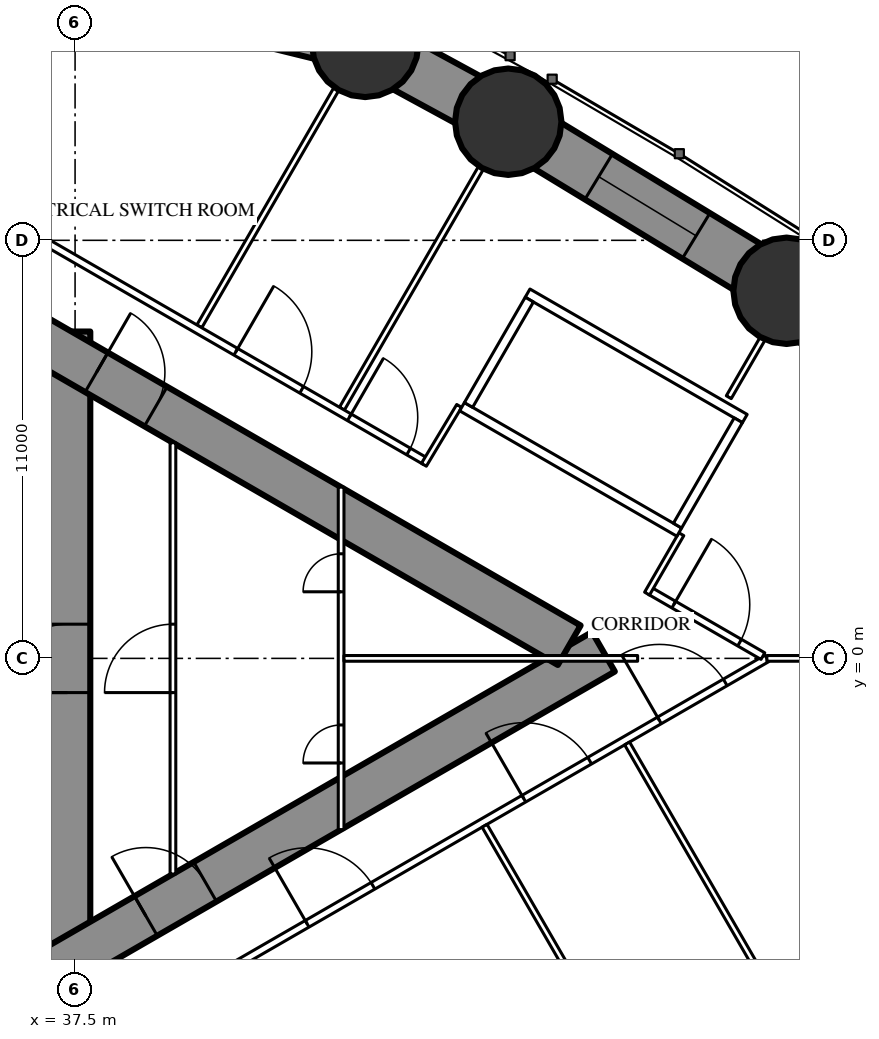
"""IFC4 building model, lengths in metres.
Left out: names, types, materials, properties, quantities, classifications, styles, units other than length and angle.
Written with IfcOpenShell. Run it as: python <this file> out.ifc"""

import sys

from ifc_helpers import new_model, si_unit, direction, frame, frame_2d, origin, origin_2d, place, context, subcontext, project, spatial, rectangle, circle, extrude, element, fill, save


model = new_model("IFC4")
c1 = context("Model", 3, precision=1e-05, world=origin(), true_north=direction((0.0, 1.0)))
c2 = subcontext(c1, "Body", "Model", "MODEL_VIEW")
j1 = project(units=[si_unit("LENGTHUNIT", "METRE"), si_unit("PLANEANGLEUNIT", "RADIAN")], contexts=[c1])
p1 = place(None, origin())
s1 = spatial("IfcSite", under=j1, at=p1, CompositionType="ELEMENT")
p2 = place(p1, origin())
s2 = spatial("IfcBuilding", under=s1, at=p2, CompositionType="ELEMENT")
p3 = place(p2, frame((0.0, 0.0, 201.8)))
s3 = spatial("IfcBuildingStorey", under=s2, at=p3, CompositionType="ELEMENT", Elevation=201.8)
for number, where, z_axis, x_axis in (
    (1, (56.221, 9.672, 0.0), (0.0, 0.0, 1.0), (1.0, 0.0, 0.0)),
    (2, (48.897, 14.121, 0.0), (0.0, 0.0, 1.0), (1.0, 0.0, 0.0)),
    (3, (45.134, 16.168, 0.0), (0.0, 0.0, 1.0), (1.0, 0.0, 0.0)),
):
    element("IfcColumn", number, at=place(p3, frame(where, z_axis=z_axis, x_axis=x_axis)), inside=s3, PredefinedType="COLUMN", context=c2, shape_type="SweptSolid", body=[
        extrude(circle(Radius=1.4, at=origin_2d()), origin(), (0.0, 0.0, 1.0), 3.5),
    ])
p4 = place(p3, frame((37.3, -8.6, 0.0), z_axis=(0.0, 0.0, 1.0), x_axis=(0.0, 1.0, 0.0)))
e4 = element("IfcWall", 4, at=p4, inside=s3, PredefinedType="SHEAR", context=c2, shape_type="SweptSolid", body=[
    extrude(rectangle(XDim=17.2, YDim=1.2, at=frame_2d((8.6, 0.0))), origin(), (0.0, 0.0, 1.0), 3.5),
])
p5 = place(p4, frame((7.7, 0.0, 0.0)))
e5 = element("IfcOpeningElement", 5, at=p5, cuts=e4, PredefinedType="OPENING", context=c2, shape_type="SweptSolid", body=[
    extrude(rectangle(XDim=1.8, YDim=2.2, at=frame_2d((0.9, 1.1))), frame((0.0, 0.61, 0.0), z_axis=(0.0, -1.0, 0.0), x_axis=(1.0, 0.0, 0.0)), (0.0, 0.0, 1.0), 1.22),
])
p6 = place(p3, frame((27.2, -13.8, 0.0), z_axis=(0.0, 0.0, 1.0), x_axis=(0.866027159892, 0.499996958321, 0.0)))
e6 = element("IfcWall", 6, at=p6, inside=s3, PredefinedType="SHEAR", context=c2, shape_type="SweptSolid", body=[
    extrude(rectangle(XDim=27.947, YDim=1.2, at=frame_2d((13.973, 0.0))), origin(), (0.0, 0.0, 1.0), 3.5),
])
p7 = place(p6, frame((6.5, 0.0, 0.0)))
e7 = element("IfcOpeningElement", 7, at=p7, cuts=e6, PredefinedType="OPENING", context=c2, shape_type="SweptSolid", body=[
    extrude(rectangle(XDim=1.0, YDim=2.2, at=frame_2d((0.5, 1.1))), frame((0.0, 0.61, 0.0), z_axis=(0.0, -1.0, 0.0), x_axis=(1.0, 0.0, 0.0)), (0.0, 0.0, 1.0), 1.22),
])
p8 = place(p6, frame((14.045, 0.0, 0.0)))
e8 = element("IfcOpeningElement", 8, at=p8, cuts=e6, PredefinedType="OPENING", context=c2, shape_type="SweptSolid", body=[
    extrude(rectangle(XDim=1.8, YDim=2.2, at=frame_2d((0.9, 1.1))), frame((0.0, 0.61, 0.0), z_axis=(0.0, -1.0, 0.0), x_axis=(1.0, 0.0, 0.0)), (0.0, 0.0, 1.0), 1.22),
])
p9 = place(p3, frame((27.2, 13.8, 0.0), z_axis=(0.0, 0.0, 1.0), x_axis=(0.866024515034, -0.500001539357, 0.0)))
e9 = element("IfcWall", 9, at=p9, inside=s3, PredefinedType="SHEAR", context=c2, shape_type="SweptSolid", body=[
    extrude(rectangle(XDim=26.907, YDim=1.2, at=frame_2d((13.454, 0.0))), origin(), (0.0, 0.0, 1.0), 3.5),
])
p10 = place(p9, frame((6.5, 0.0, 0.0)))
e10 = element("IfcOpeningElement", 10, at=p10, cuts=e9, PredefinedType="OPENING", context=c2, shape_type="SweptSolid", body=[
    extrude(rectangle(XDim=1.0, YDim=2.2, at=frame_2d((0.5, 1.1))), frame((0.0, 0.61, 0.0), z_axis=(0.0, -1.0, 0.0), x_axis=(1.0, 0.0, 0.0)), (0.0, 0.0, 1.0), 1.22),
])
p11 = place(p9, frame((12.545, 0.0, 0.0)))
e11 = element("IfcOpeningElement", 11, at=p11, cuts=e9, PredefinedType="OPENING", context=c2, shape_type="SweptSolid", body=[
    extrude(rectangle(XDim=1.8, YDim=2.2, at=frame_2d((0.9, 1.1))), frame((0.0, 0.61, 0.0), z_axis=(0.0, -1.0, 0.0), x_axis=(1.0, 0.0, 0.0)), (0.0, 0.0, 1.0), 1.22),
])
p12 = place(p3, frame((56.221, -9.672, 0.0), z_axis=(0.0, 0.0, 1.0), x_axis=(0.697649905443, 0.716438838587, 0.0)))
e12 = element("IfcWall", 12, at=p12, inside=s3, PredefinedType="SHEAR", context=c2, shape_type="SweptSolid", body=[
    extrude(rectangle(XDim=13.501, YDim=1.4, at=frame_2d((6.75, 0.0))), origin(), (0.0, 0.0, 1.0), 3.5),
])
p13 = place(p12, frame((5.25, 0.0, 0.6)))
e13 = element("IfcOpeningElement", 13, at=p13, cuts=e12, PredefinedType="OPENING", context=c2, shape_type="SweptSolid", body=[
    extrude(rectangle(XDim=3.0, YDim=1.2, at=frame_2d((1.5, 0.6))), frame((0.0, 0.71, 0.0), z_axis=(0.0, -1.0, 0.0), x_axis=(1.0, 0.0, 0.0)), (0.0, 0.0, 1.0), 1.42),
])
p14 = place(p3, frame((65.64, 0.0, 0.0), z_axis=(0.0, 0.0, 1.0), x_axis=(-0.697649905443, 0.716438838587, 0.0)))
e14 = element("IfcWall", 14, at=p14, inside=s3, PredefinedType="SHEAR", context=c2, shape_type="SweptSolid", body=[
    extrude(rectangle(XDim=13.501, YDim=1.4, at=frame_2d((6.75, 0.0))), origin(), (0.0, 0.0, 1.0), 3.5),
])
p15 = place(p14, frame((5.25, 0.0, 0.6)))
e15 = element("IfcOpeningElement", 15, at=p15, cuts=e14, PredefinedType="OPENING", context=c2, shape_type="SweptSolid", body=[
    extrude(rectangle(XDim=3.0, YDim=1.2, at=frame_2d((1.5, 0.6))), frame((0.0, 0.71, 0.0), z_axis=(0.0, -1.0, 0.0), x_axis=(1.0, 0.0, 0.0)), (0.0, 0.0, 1.0), 1.42),
])
p16 = place(p3, frame((56.221, 9.672, 0.0), z_axis=(0.0, 0.0, 1.0), x_axis=(-0.854692251129, 0.519135007353, 0.0)))
e16 = element("IfcWall", 16, at=p16, inside=s3, PredefinedType="SHEAR", context=c2, shape_type="SweptSolid", body=[
    extrude(rectangle(XDim=8.569, YDim=1.4, at=frame_2d((4.284, 0.0))), origin(), (0.0, 0.0, 1.0), 3.5),
])
p17 = place(p16, frame((2.784, 0.0, 0.6)))
e17 = element("IfcOpeningElement", 17, at=p17, cuts=e16, PredefinedType="OPENING", context=c2, shape_type="SweptSolid", body=[
    extrude(rectangle(XDim=3.0, YDim=1.2, at=frame_2d((1.5, 0.6))), frame((0.0, 0.71, 0.0), z_axis=(0.0, -1.0, 0.0), x_axis=(1.0, 0.0, 0.0)), (0.0, 0.0, 1.0), 1.42),
])
p18 = place(p3, frame((48.897, 14.121, 0.0), z_axis=(0.0, 0.0, 1.0), x_axis=(-0.878404597051, 0.477917737566, 0.0)))
e18 = element("IfcWall", 18, at=p18, inside=s3, PredefinedType="SHEAR", context=c2, shape_type="SweptSolid", body=[
    extrude(rectangle(XDim=4.285, YDim=1.4, at=frame_2d((2.143, 0.0))), origin(), (0.0, 0.0, 1.0), 3.5),
])
p19 = place(p3, frame((45.134, 16.168, 0.0), z_axis=(0.0, 0.0, 1.0), x_axis=(-0.971093253227, 0.238700426344, 0.0)))
e19 = element("IfcWall", 19, at=p19, inside=s3, PredefinedType="SHEAR", context=c2, shape_type="SweptSolid", body=[
    extrude(rectangle(XDim=13.772, YDim=1.4, at=frame_2d((6.886, 0.0))), origin(), (0.0, 0.0, 1.0), 3.5),
])
p20 = place(p19, frame((5.386, 0.0, 0.6)))
e20 = element("IfcOpeningElement", 20, at=p20, cuts=e19, PredefinedType="OPENING", context=c2, shape_type="SweptSolid", body=[
    extrude(rectangle(XDim=3.0, YDim=1.2, at=frame_2d((1.5, 0.6))), frame((0.0, 0.71, 0.0), z_axis=(0.0, -1.0, 0.0), x_axis=(1.0, 0.0, 0.0)), (0.0, 0.0, 1.0), 1.42),
])
p21 = place(p3, frame((27.903, -16.05, 0.0), z_axis=(0.0, 0.0, 1.0), x_axis=(0.866022581743, 0.500004887887, 0.0)))
e21 = element("IfcWall", 21, at=p21, inside=s3, PredefinedType="PARTITIONING", context=c2, shape_type="SweptSolid", body=[
    extrude(rectangle(XDim=32.1, YDim=0.2, at=frame_2d((16.05, 0.0))), origin(), (0.0, 0.0, 1.0), 3.25),
])
p22 = place(p21, frame((5.212, 0.0, 0.0)))
e22 = element("IfcOpeningElement", 22, at=p22, cuts=e21, PredefinedType="OPENING", context=c2, shape_type="SweptSolid", body=[
    extrude(rectangle(XDim=2.0, YDim=2.4, at=frame_2d((1.0, 1.2))), frame((0.0, 0.11, 0.0), z_axis=(0.0, -1.0, 0.0), x_axis=(1.0, 0.0, 0.0)), (0.0, 0.0, 1.0), 0.22),
])
p23 = place(p21, frame((18.133, 0.0, 0.0)))
e23 = element("IfcOpeningElement", 23, at=p23, cuts=e21, PredefinedType="OPENING", context=c2, shape_type="SweptSolid", body=[
    extrude(rectangle(XDim=2.0, YDim=2.4, at=frame_2d((1.0, 1.2))), frame((0.0, 0.11, 0.0), z_axis=(0.0, -1.0, 0.0), x_axis=(1.0, 0.0, 0.0)), (0.0, 0.0, 1.0), 0.22),
])
p24 = place(p21, frame((24.717, 0.0, 0.0)))
e24 = element("IfcOpeningElement", 24, at=p24, cuts=e21, PredefinedType="OPENING", context=c2, shape_type="SweptSolid", body=[
    extrude(rectangle(XDim=2.0, YDim=2.4, at=frame_2d((1.0, 1.2))), frame((0.0, 0.11, 0.0), z_axis=(0.0, -1.0, 0.0), x_axis=(1.0, 0.0, 0.0)), (0.0, 0.0, 1.0), 0.22),
])
p25 = place(p21, frame((28.836, 0.0, 0.0)))
e25 = element("IfcOpeningElement", 25, at=p25, cuts=e21, PredefinedType="OPENING", context=c2, shape_type="SweptSolid", body=[
    extrude(rectangle(XDim=2.0, YDim=2.4, at=frame_2d((1.0, 1.2))), frame((0.0, 0.11, 0.0), z_axis=(0.0, -1.0, 0.0), x_axis=(1.0, 0.0, 0.0)), (0.0, 0.0, 1.0), 0.22),
])
p26 = place(p3, frame((48.275, -4.404, 0.0), z_axis=(0.0, 0.0, 1.0), x_axis=(0.500006004368, -0.866021937133, 0.0)))
e26 = element("IfcWall", 26, at=p26, inside=s3, PredefinedType="PARTITIONING", context=c2, shape_type="SweptSolid", body=[
    extrude(rectangle(XDim=7.279, YDim=0.15, at=frame_2d((3.64, 0.0))), origin(), (0.0, 0.0, 1.0), 2.05),
])
p27 = place(p3, frame((52.025, -2.238, 0.0), z_axis=(0.0, 0.0, 1.0), x_axis=(0.499983785035, -0.866034765296, 0.0)))
e27 = element("IfcWall", 27, at=p27, inside=s3, PredefinedType="PARTITIONING", context=c2, shape_type="SweptSolid", body=[
    extrude(rectangle(XDim=7.116, YDim=0.15, at=frame_2d((3.558, 0.0))), origin(), (0.0, 0.0, 1.0), 2.05),
])
p28 = place(p3, frame((40.769, 8.737, 0.0), z_axis=(0.0, 0.0, 1.0), x_axis=(0.500013115284, 0.866017831539, 0.0)))
e28 = element("IfcWall", 28, at=p28, inside=s3, PredefinedType="PARTITIONING", context=c2, shape_type="SweptSolid", body=[
    extrude(rectangle(XDim=7.198, YDim=0.15, at=frame_2d((3.599, 0.0))), origin(), (0.0, 0.0, 1.0), 2.05),
])
p29 = place(p3, frame((44.521, 6.571, 0.0), z_axis=(0.0, 0.0, 1.0), x_axis=(0.500020376429, 0.866013639128, 0.0)))
e29 = element("IfcWall", 29, at=p29, inside=s3, PredefinedType="PARTITIONING", context=c2, shape_type="SweptSolid", body=[
    extrude(rectangle(XDim=7.306, YDim=0.15, at=frame_2d((3.653, 0.0))), origin(), (0.0, 0.0, 1.0), 2.05),
])
p30 = place(p3, frame((55.702, 0.0, 0.0), z_axis=(0.0, 0.0, 1.0), x_axis=(1.0, 0.0, 0.0)))
e30 = element("IfcWall", 30, at=p30, inside=s3, PredefinedType="PARTITIONING", context=c2, shape_type="SweptSolid", body=[
    extrude(rectangle(XDim=8.518, YDim=0.15, at=frame_2d((4.259, 0.0))), origin(), (0.0, 0.0, 1.0), 2.05),
])
p31 = place(p3, frame((54.7, 6.872, 0.0), z_axis=(0.0, 0.0, 1.0), x_axis=(0.499989690894, 0.866031355668, 0.0)))
e31 = element("IfcWall", 31, at=p31, inside=s3, PredefinedType="PARTITIONING", context=c2, shape_type="SweptSolid", body=[
    extrude(rectangle(XDim=1.766, YDim=0.15, at=frame_2d((0.883, 0.0))), origin(), (0.0, 0.0, 1.0), 3.25),
])
p32 = place(p3, frame((27.903, 16.05, 0.0), z_axis=(0.0, 0.0, 1.0), x_axis=(0.866024818307, -0.500001014076, 0.0)))
e32 = element("IfcWall", 32, at=p32, inside=s3, PredefinedType="PARTITIONING", context=c2, shape_type="SweptSolid", body=[
    extrude(rectangle(XDim=21.723, YDim=0.2, at=frame_2d((10.862, 0.0))), origin(), (0.0, 0.0, 1.0), 3.25),
])
p33 = place(p32, frame((15.966, 0.0, 0.0)))
e33 = element("IfcOpeningElement", 33, at=p33, cuts=e32, PredefinedType="OPENING", context=c2, shape_type="SweptSolid", body=[
    extrude(rectangle(XDim=2.0, YDim=2.03, at=frame_2d((1.0, 1.015))), frame((0.0, 0.11, 0.0), z_axis=(0.0, -1.0, 0.0), x_axis=(1.0, 0.0, 0.0)), (0.0, 0.0, 1.0), 0.22),
])
p34 = place(p32, frame((5.662, 0.0, 0.0)))
e34 = element("IfcOpeningElement", 34, at=p34, cuts=e32, PredefinedType="OPENING", context=c2, shape_type="SweptSolid", body=[
    extrude(rectangle(XDim=2.0, YDim=2.4, at=frame_2d((1.0, 1.2))), frame((0.0, 0.11, 0.0), z_axis=(0.0, -1.0, 0.0), x_axis=(1.0, 0.0, 0.0)), (0.0, 0.0, 1.0), 0.22),
])
p35 = place(p32, frame((19.415, 0.0, 0.0)))
e35 = element("IfcOpeningElement", 35, at=p35, cuts=e32, PredefinedType="OPENING", context=c2, shape_type="SweptSolid", body=[
    extrude(rectangle(XDim=1.8, YDim=2.2, at=frame_2d((0.9, 1.1))), frame((0.0, 0.11, 0.0), z_axis=(0.0, -1.0, 0.0), x_axis=(1.0, 0.0, 0.0)), (0.0, 0.0, 1.0), 0.22),
])
p36 = place(p3, frame((52.639, 1.769, 0.0), z_axis=(0.0, 0.0, 1.0), x_axis=(0.866027340901, -0.4999966448, 0.0)))
e36 = element("IfcWall", 36, at=p36, inside=s3, PredefinedType="PARTITIONING", context=c2, shape_type="SweptSolid", body=[
    extrude(rectangle(XDim=3.417, YDim=0.2, at=frame_2d((1.708, 0.0))), origin(), (0.0, 0.0, 1.0), 3.25),
])
p37 = place(p36, frame((0.708, 0.0, 0.0)))
e37 = element("IfcOpeningElement", 37, at=p37, cuts=e36, PredefinedType="OPENING", context=c2, shape_type="SweptSolid", body=[
    extrude(rectangle(XDim=2.0, YDim=2.03, at=frame_2d((1.0, 1.015))), frame((0.0, 0.11, 0.0), z_axis=(0.0, -1.0, 0.0), x_axis=(1.0, 0.0, 0.0)), (0.0, 0.0, 1.0), 0.22),
])
p38 = place(p3, frame((52.55, 1.704, 0.0), z_axis=(0.0, 0.0, 1.0), x_axis=(0.499980071345, 0.866036909293, 0.0)))
e38 = element("IfcWall", 38, at=p38, inside=s3, PredefinedType="PARTITIONING", context=c2, shape_type="SweptSolid", body=[
    extrude(rectangle(XDim=1.805, YDim=0.15, at=frame_2d((0.902, 0.0))), origin(), (0.0, 0.0, 1.0), 3.25),
])
p39 = place(p3, frame((47.606, 6.642, 0.0), z_axis=(0.0, 0.0, 1.0), x_axis=(-0.514296815006, -0.857612258585, 0.0)))
e39 = element("IfcWall", 39, at=p39, inside=s3, PredefinedType="PARTITIONING", context=c2, shape_type="SweptSolid", body=[
    extrude(rectangle(XDim=1.805, YDim=0.15, at=frame_2d((0.902, 0.0))), origin(), (0.0, 0.0, 1.0), 3.25),
])
p40 = place(p3, frame((40.075, -5.674, 0.0), z_axis=(0.0, 0.0, 1.0), x_axis=(0.0, 1.0, 0.0)))
e40 = element("IfcWall", 40, at=p40, inside=s3, PredefinedType="PARTITIONING", context=c2, shape_type="SweptSolid", body=[
    extrude(rectangle(XDim=11.348, YDim=0.15, at=frame_2d((5.674, 0.0))), origin(), (0.0, 0.0, 1.0), 3.25),
])
p41 = place(p40, frame((4.774, 0.0, 0.0)))
e41 = element("IfcOpeningElement", 41, at=p41, cuts=e40, PredefinedType="OPENING", context=c2, shape_type="SweptSolid", body=[
    extrude(rectangle(XDim=1.8, YDim=2.2, at=frame_2d((0.9, 1.1))), frame((0.0, 0.085, 0.0), z_axis=(0.0, -1.0, 0.0), x_axis=(1.0, 0.0, 0.0)), (0.0, 0.0, 1.0), 0.17),
])
p42 = place(p3, frame((44.5, -4.505, 0.0), z_axis=(0.0, 0.0, 1.0), x_axis=(0.0, 1.0, 0.0)))
e42 = element("IfcWall", 42, at=p42, inside=s3, PredefinedType="PARTITIONING", context=c2, shape_type="SweptSolid", body=[
    extrude(rectangle(XDim=9.009, YDim=0.15, at=frame_2d((4.505, 0.0))), origin(), (0.0, 0.0, 1.0), 3.25),
])
p43 = place(p42, frame((1.752, 0.0, 0.0)))
e43 = element("IfcOpeningElement", 43, at=p43, cuts=e42, PredefinedType="OPENING", context=c2, shape_type="SweptSolid", body=[
    extrude(rectangle(XDim=1.0, YDim=2.2, at=frame_2d((0.5, 1.1))), frame((0.0, 0.085, 0.0), z_axis=(0.0, -1.0, 0.0), x_axis=(1.0, 0.0, 0.0)), (0.0, 0.0, 1.0), 0.17),
])
p44 = place(p42, frame((6.257, 0.0, 0.0)))
e44 = element("IfcOpeningElement", 44, at=p44, cuts=e42, PredefinedType="OPENING", context=c2, shape_type="SweptSolid", body=[
    extrude(rectangle(XDim=1.0, YDim=2.2, at=frame_2d((0.5, 1.1))), frame((0.0, 0.085, 0.0), z_axis=(0.0, -1.0, 0.0), x_axis=(1.0, 0.0, 0.0)), (0.0, 0.0, 1.0), 0.17),
])
p45 = place(p3, frame((44.575, 0.0, 0.0), z_axis=(0.0, 0.0, 1.0), x_axis=(1.0, 0.0, 0.0)))
e45 = element("IfcWall", 45, at=p45, inside=s3, PredefinedType="PARTITIONING", context=c2, shape_type="SweptSolid", body=[
    extrude(rectangle(XDim=7.727, YDim=0.15, at=frame_2d((3.864, 0.0))), origin(), (0.0, 0.0, 1.0), 2.05),
])
for number, where, z_axis, x_axis in (
    (46, (47.681, 6.622, 0.0), (0.0, 0.0, 1.0), (0.866, -0.5, 0.0)),
    (47, (49.406, 9.611, 0.0), (0.0, 0.0, 1.0), (0.866, -0.5, 0.0)),
):
    element("IfcWall", number, at=place(p3, frame(where, z_axis=z_axis, x_axis=x_axis)), inside=s3, PredefinedType="PARTITIONING", context=c2, shape_type="SweptSolid", body=[
        extrude(rectangle(XDim=6.6, YDim=0.25, at=frame_2d((3.3, 0.0))), origin(), (0.0, 0.0, 1.0), 3.25),
    ])
p46 = place(p3, frame((47.852, 6.668, 0.0), z_axis=(0.0, 0.0, 1.0), x_axis=(0.499929347863, 0.866066190972, 0.0)))
e48 = element("IfcWall", 48, at=p46, inside=s3, PredefinedType="PARTITIONING", context=c2, shape_type="SweptSolid", body=[
    extrude(rectangle(XDim=3.201, YDim=0.25, at=frame_2d((1.6, 0.0))), origin(), (0.0, 0.0, 1.0), 3.25),
])
p47 = place(p3, frame((53.352, 3.493, 0.0), z_axis=(0.0, 0.0, 1.0), x_axis=(0.499872130319, 0.866099216793, 0.0)))
e49 = element("IfcWall", 49, at=p47, inside=s3, PredefinedType="PARTITIONING", context=c2, shape_type="SweptSolid", body=[
    extrude(rectangle(XDim=3.2, YDim=0.25, at=frame_2d((1.6, 0.0))), origin(), (0.0, 0.0, 1.0), 3.25),
])
p48 = place(p17, origin())
e50 = element("IfcWindow", 50, at=p48, inside=s3, PartitioningType="SINGLE_PANEL", PredefinedType="WINDOW", context=c2, shape_type="SweptSolid", body=[
    extrude(rectangle(XDim=3.0, YDim=1.2, at=frame_2d((1.5, 0.6))), frame((0.0, 0.03, 0.0), z_axis=(0.0, -1.0, 0.0), x_axis=(1.0, 0.0, 0.0)), (0.0, 0.0, 1.0), 0.06),
])
fill(e17, e50)
p49 = place(p23, origin())
e51 = element("IfcDoor", 51, at=p49, inside=s3, OperationType="DOUBLE_DOOR_SINGLE_SWING", PredefinedType="DOOR", context=c2, shape_type="SweptSolid", body=[
    extrude(rectangle(XDim=2.0, YDim=2.4, at=frame_2d((1.0, 1.2))), frame((0.0, 0.025, 0.0), z_axis=(0.0, -1.0, 0.0), x_axis=(1.0, 0.0, 0.0)), (0.0, 0.0, 1.0), 0.05),
])
fill(e23, e51)
p50 = place(p24, origin())
e52 = element("IfcDoor", 52, at=p50, inside=s3, OperationType="DOUBLE_DOOR_SINGLE_SWING", PredefinedType="DOOR", context=c2, shape_type="SweptSolid", body=[
    extrude(rectangle(XDim=2.0, YDim=2.4, at=frame_2d((1.0, 1.2))), frame((0.0, 0.025, 0.0), z_axis=(0.0, -1.0, 0.0), x_axis=(1.0, 0.0, 0.0)), (0.0, 0.0, 1.0), 0.05),
])
fill(e24, e52)
p51 = place(p25, origin())
e53 = element("IfcDoor", 53, at=p51, inside=s3, OperationType="DOUBLE_DOOR_SINGLE_SWING", PredefinedType="DOOR", context=c2, shape_type="SweptSolid", body=[
    extrude(rectangle(XDim=2.0, YDim=2.4, at=frame_2d((1.0, 1.2))), frame((0.0, 0.025, 0.0), z_axis=(0.0, -1.0, 0.0), x_axis=(1.0, 0.0, 0.0)), (0.0, 0.0, 1.0), 0.05),
])
fill(e25, e53)
p52 = place(p33, origin())
e54 = element("IfcDoor", 54, at=p52, inside=s3, OperationType="DOUBLE_DOOR_SINGLE_SWING", PredefinedType="DOOR", context=c2, shape_type="SweptSolid", body=[
    extrude(rectangle(XDim=2.0, YDim=2.03, at=frame_2d((1.0, 1.015))), frame((0.0, 0.025, 0.0), z_axis=(0.0, -1.0, 0.0), x_axis=(1.0, 0.0, 0.0)), (0.0, 0.0, 1.0), 0.05),
])
fill(e33, e54)
p53 = place(p37, origin())
e55 = element("IfcDoor", 55, at=p53, inside=s3, OperationType="DOUBLE_DOOR_SINGLE_SWING", PredefinedType="DOOR", context=c2, shape_type="SweptSolid", body=[
    extrude(rectangle(XDim=2.0, YDim=2.03, at=frame_2d((1.0, 1.015))), frame((0.0, 0.025, 0.0), z_axis=(0.0, -1.0, 0.0), x_axis=(1.0, 0.0, 0.0)), (0.0, 0.0, 1.0), 0.05),
])
fill(e37, e55)
p54 = place(p35, origin())
e56 = element("IfcDoor", 56, at=p54, inside=s3, OperationType="DOUBLE_DOOR_SINGLE_SWING", PredefinedType="DOOR", context=c2, shape_type="SweptSolid", body=[
    extrude(rectangle(XDim=1.8, YDim=2.2, at=frame_2d((0.9, 1.1))), frame((0.0, 0.025, 0.0), z_axis=(0.0, -1.0, 0.0), x_axis=(1.0, 0.0, 0.0)), (0.0, 0.0, 1.0), 0.05),
])
fill(e35, e56)
p55 = place(p41, origin())
e57 = element("IfcDoor", 57, at=p55, inside=s3, OperationType="DOUBLE_DOOR_SINGLE_SWING", PredefinedType="DOOR", context=c2, shape_type="SweptSolid", body=[
    extrude(rectangle(XDim=1.8, YDim=2.2, at=frame_2d((0.9, 1.1))), frame((0.0, 0.025, 0.0), z_axis=(0.0, -1.0, 0.0), x_axis=(1.0, 0.0, 0.0)), (0.0, 0.0, 1.0), 0.05),
])
fill(e41, e57)
p56 = place(p43, origin())
e58 = element("IfcDoor", 58, at=p56, inside=s3, OperationType="SINGLE_SWING_LEFT", PredefinedType="DOOR", context=c2, shape_type="SweptSolid", body=[
    extrude(rectangle(XDim=1.0, YDim=2.2, at=frame_2d((0.5, 1.1))), frame((0.0, 0.025, 0.0), z_axis=(0.0, -1.0, 0.0), x_axis=(1.0, 0.0, 0.0)), (0.0, 0.0, 1.0), 0.05),
])
fill(e43, e58)
p57 = place(p44, origin())
e59 = element("IfcDoor", 59, at=p57, inside=s3, OperationType="SINGLE_SWING_LEFT", PredefinedType="DOOR", context=c2, shape_type="SweptSolid", body=[
    extrude(rectangle(XDim=1.0, YDim=2.2, at=frame_2d((0.5, 1.1))), frame((0.0, 0.025, 0.0), z_axis=(0.0, -1.0, 0.0), x_axis=(1.0, 0.0, 0.0)), (0.0, 0.0, 1.0), 0.05),
])
fill(e44, e59)
p58 = place(p8, origin())
e60 = element("IfcDoor", 60, at=p58, inside=s3, OperationType="DOUBLE_DOOR_SINGLE_SWING", PredefinedType="DOOR", context=c2, shape_type="SweptSolid", body=[
    extrude(rectangle(XDim=1.8, YDim=2.2, at=frame_2d((0.9, 1.1))), frame((0.0, 0.025, 0.0), z_axis=(0.0, -1.0, 0.0), x_axis=(1.0, 0.0, 0.0)), (0.0, 0.0, 1.0), 0.05),
])
fill(e8, e60)
p59 = place(p11, origin())
e61 = element("IfcDoor", 61, at=p59, inside=s3, OperationType="DOUBLE_DOOR_SINGLE_SWING", PredefinedType="DOOR", context=c2, shape_type="SweptSolid", body=[
    extrude(rectangle(XDim=1.8, YDim=2.2, at=frame_2d((0.9, 1.1))), frame((0.0, 0.025, 0.0), z_axis=(0.0, -1.0, 0.0), x_axis=(1.0, 0.0, 0.0)), (0.0, 0.0, 1.0), 0.05),
])
fill(e11, e61)
p60 = place(p5, origin())
e62 = element("IfcDoor", 62, at=p60, inside=s3, OperationType="DOUBLE_DOOR_SINGLE_SWING", PredefinedType="DOOR", context=c2, shape_type="SweptSolid", body=[
    extrude(rectangle(XDim=1.8, YDim=2.2, at=frame_2d((0.9, 1.1))), frame((0.0, 0.025, 0.0), z_axis=(0.0, -1.0, 0.0), x_axis=(1.0, 0.0, 0.0)), (0.0, 0.0, 1.0), 0.05),
])
fill(e5, e62)
save(model, sys.argv[1])
